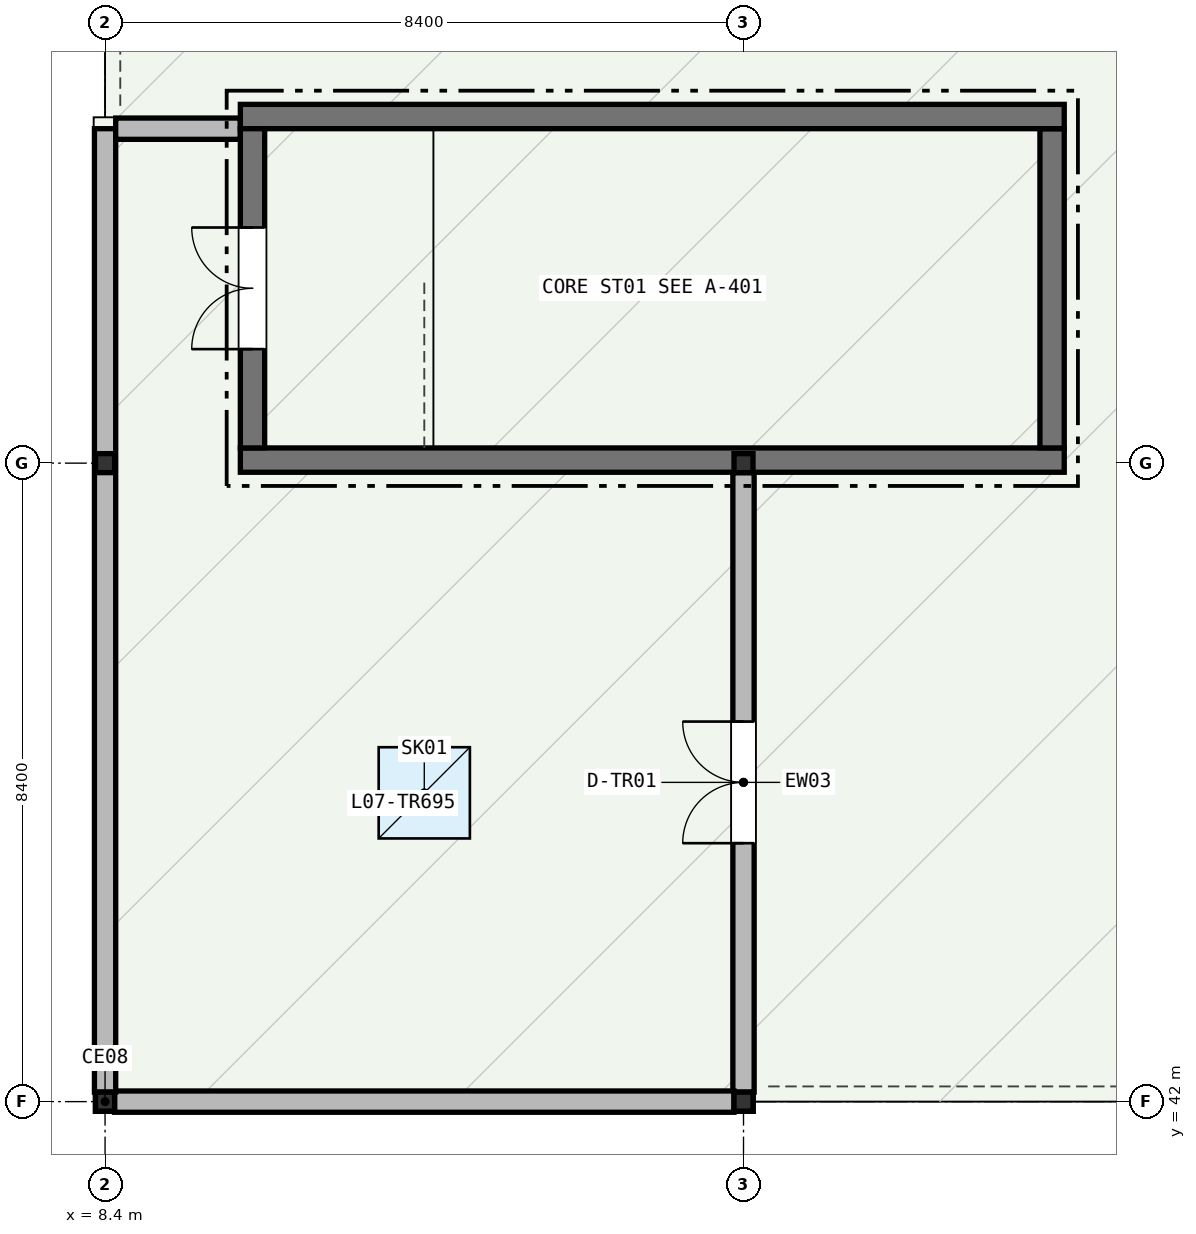
"""IFC4 building model, lengths in metres.
Left out: names, types, materials, properties, quantities, classifications, styles, units other than length and angle.
Written with IfcOpenShell. Run it as: python <this file> out.ifc"""

import sys

from ifc_helpers import new_model, si_unit, direction, frame, frame_2d, origin, origin_2d, place, context, subcontext, project, spatial, rectangle, i_section, extrude, element, fill, save


model = new_model("IFC4")
c1 = context("Model", 3, precision=1e-05, world=origin(), true_north=direction((0.0, 1.0)))
c2 = subcontext(c1, "Body", "Model", "MODEL_VIEW")
j1 = project(units=[si_unit("LENGTHUNIT", "METRE"), si_unit("PLANEANGLEUNIT", "RADIAN")], contexts=[c1])
p1 = place(None, origin())
s1 = spatial("IfcSite", under=j1, at=p1, CompositionType="ELEMENT")
p2 = place(p1, origin())
s2 = spatial("IfcBuilding", under=s1, at=p2, CompositionType="ELEMENT")
p3 = place(p2, frame((0.0, 0.0, 31.8)))
s3 = spatial("IfcBuildingStorey", under=s2, at=p3, CompositionType="ELEMENT", Elevation=31.8)
for number, where, z_axis, x_axis in (
    (1, (8.4, 42.0, 0.0), (0.0, 0.0, 1.0), (1.0, 0.0, 0.0)),
    (2, (16.8, 42.0, 0.0), (0.0, 0.0, 1.0), (1.0, 0.0, 0.0)),
    (3, (16.8, 50.4, 0.0), (0.0, 0.0, 1.0), (1.0, 0.0, 0.0)),
    (4, (8.4, 50.4, 0.0), (0.0, 0.0, 1.0), (1.0, 0.0, 0.0)),
):
    element("IfcColumn", number, at=place(p3, frame(where, z_axis=z_axis, x_axis=x_axis)), inside=s3, PredefinedType="COLUMN", context=c2, shape_type="SweptSolid", body=[
        extrude(i_section(OverallWidth=0.25, OverallDepth=0.25, WebThickness=0.009, FlangeThickness=0.014, FilletRadius=0.016, at=origin_2d()), origin(), (0.0, 0.0, 1.0), 3.2),
    ])
p4 = place(p3, frame((16.8, 42.125, 0.0), z_axis=(0.0, 0.0, 1.0), x_axis=(0.0, 1.0, 0.0)))
e5 = element("IfcWall", 5, at=p4, inside=s3, PredefinedType="STANDARD", context=c2, shape_type="SweptSolid", body=[
    extrude(rectangle(XDim=8.15, YDim=0.28, at=frame_2d((4.075, 0.0))), origin(), (0.0, 0.0, 1.0), 2.79),
])
p5 = place(p4, frame((3.275, 0.0, 0.0)))
e6 = element("IfcOpeningElement", 6, at=p5, cuts=e5, PredefinedType="OPENING", context=c2, shape_type="SweptSolid", body=[
    extrude(rectangle(XDim=1.6, YDim=2.2, at=frame_2d((0.8, 1.1))), frame((0.0, 0.15, 0.0), z_axis=(0.0, -1.0, 0.0), x_axis=(1.0, 0.0, 0.0)), (0.0, 0.0, 1.0), 0.3),
])
p6 = place(p3, frame((16.675, 42.0, 0.0), z_axis=(0.0, 0.0, 1.0), x_axis=(-1.0, 0.0, 0.0)))
e7 = element("IfcWall", 7, at=p6, inside=s3, PredefinedType="STANDARD", context=c2, shape_type="SweptSolid", body=[
    extrude(rectangle(XDim=8.15, YDim=0.28, at=frame_2d((4.075, 0.0))), origin(), (0.0, 0.0, 1.0), 2.79),
])
p7 = place(p3, frame((8.4, 42.125, 0.0), z_axis=(0.0, 0.0, 1.0), x_axis=(0.0, 1.0, 0.0)))
e8 = element("IfcWall", 8, at=p7, inside=s3, PredefinedType="STANDARD", context=c2, shape_type="SweptSolid", body=[
    extrude(rectangle(XDim=12.675, YDim=0.28, at=frame_2d((6.337, 0.0))), origin(), (0.0, 0.0, 1.0), 2.79),
])
p8 = place(p3, frame((10.18, 54.8, 0.0), z_axis=(0.0, 0.0, 1.0), x_axis=(-1.0, 0.0, 0.0)))
e9 = element("IfcWall", 9, at=p8, inside=s3, PredefinedType="STANDARD", context=c2, shape_type="SweptSolid", body=[
    extrude(rectangle(XDim=1.64, YDim=0.28, at=frame_2d((0.82, 0.0))), origin(), (0.0, 0.0, 1.0), 2.79),
])
p9 = place(p3, frame((10.18, 50.44, 0.0), z_axis=(0.0, 0.0, 1.0), x_axis=(1.0, 0.0, 0.0)))
e10 = element("IfcWall", 10, at=p9, inside=s3, PredefinedType="SHEAR", context=c2, shape_type="SweptSolid", body=[
    extrude(rectangle(XDim=10.84, YDim=0.32, at=frame_2d((5.42, 0.0))), origin(), (0.0, 0.0, 1.0), 3.2),
])
p10 = place(p3, frame((20.86, 50.6, 0.0), z_axis=(0.0, 0.0, 1.0), x_axis=(0.0, 1.0, 0.0)))
e11 = element("IfcWall", 11, at=p10, inside=s3, PredefinedType="SHEAR", context=c2, shape_type="SweptSolid", body=[
    extrude(rectangle(XDim=4.2, YDim=0.32, at=frame_2d((2.1, 0.0))), origin(), (0.0, 0.0, 1.0), 3.2),
])
p11 = place(p3, frame((21.02, 54.96, 0.0), z_axis=(0.0, 0.0, 1.0), x_axis=(-1.0, 0.0, 0.0)))
e12 = element("IfcWall", 12, at=p11, inside=s3, PredefinedType="SHEAR", context=c2, shape_type="SweptSolid", body=[
    extrude(rectangle(XDim=10.84, YDim=0.32, at=frame_2d((5.42, 0.0))), origin(), (0.0, 0.0, 1.0), 3.2),
])
p12 = place(p3, frame((10.34, 54.8, 0.0), z_axis=(0.0, 0.0, 1.0), x_axis=(0.0, -1.0, 0.0)))
e13 = element("IfcWall", 13, at=p12, inside=s3, PredefinedType="SHEAR", context=c2, shape_type="SweptSolid", body=[
    extrude(rectangle(XDim=4.2, YDim=0.32, at=frame_2d((2.1, 0.0))), origin(), (0.0, 0.0, 1.0), 3.2),
])
p13 = place(p12, frame((1.3, 0.0, 0.0)))
e14 = element("IfcOpeningElement", 14, at=p13, cuts=e13, PredefinedType="OPENING", context=c2, shape_type="SweptSolid", body=[
    extrude(rectangle(XDim=1.6, YDim=2.2, at=frame_2d((0.8, 1.1))), frame((0.0, 0.17, 0.0), z_axis=(0.0, -1.0, 0.0), x_axis=(1.0, 0.0, 0.0)), (0.0, 0.0, 1.0), 0.34),
])
p14 = place(p5, origin())
e15 = element("IfcDoor", 15, at=p14, inside=s3, OperationType="DOUBLE_DOOR_SINGLE_SWING", PredefinedType="DOOR", context=c2, shape_type="SweptSolid", body=[
    extrude(rectangle(XDim=1.6, YDim=2.2, at=frame_2d((0.8, 1.1))), frame((0.0, 0.025, 0.0), z_axis=(0.0, -1.0, 0.0), x_axis=(1.0, 0.0, 0.0)), (0.0, 0.0, 1.0), 0.05),
])
fill(e6, e15)
p15 = place(p3, frame((0.0, 0.0, 3.2)))
p16 = place(p15, frame((12.6, 46.062, -0.01)))
p17 = place(p16, frame((0.0, 0.0, 0.208)))
e16 = element("IfcWindow", 16, at=p17, inside=s3, PartitioningType="SINGLE_PANEL", PredefinedType="SKYLIGHT", context=c2, shape_type="SweptSolid", body=[
    extrude(rectangle(XDim=1.2, YDim=1.2, at=origin_2d()), origin(), (0.0, 0.0, 1.0), 0.05),
])
p18 = place(p13, frame((1.6, 0.0, 0.0), z_axis=(0.0, 0.0, 1.0), x_axis=(-1.0, 0.0, 0.0)))
e17 = element("IfcDoor", 17, at=p18, inside=s3, OperationType="DOUBLE_DOOR_SINGLE_SWING", PredefinedType="DOOR", context=c2, shape_type="SweptSolid", body=[
    extrude(rectangle(XDim=1.6, YDim=2.2, at=frame_2d((0.8, 1.1))), frame((0.0, 0.025, 0.0), z_axis=(0.0, -1.0, 0.0), x_axis=(1.0, 0.0, 0.0)), (0.0, 0.0, 1.0), 0.05),
])
fill(e14, e17)
save(model, sys.argv[1])
